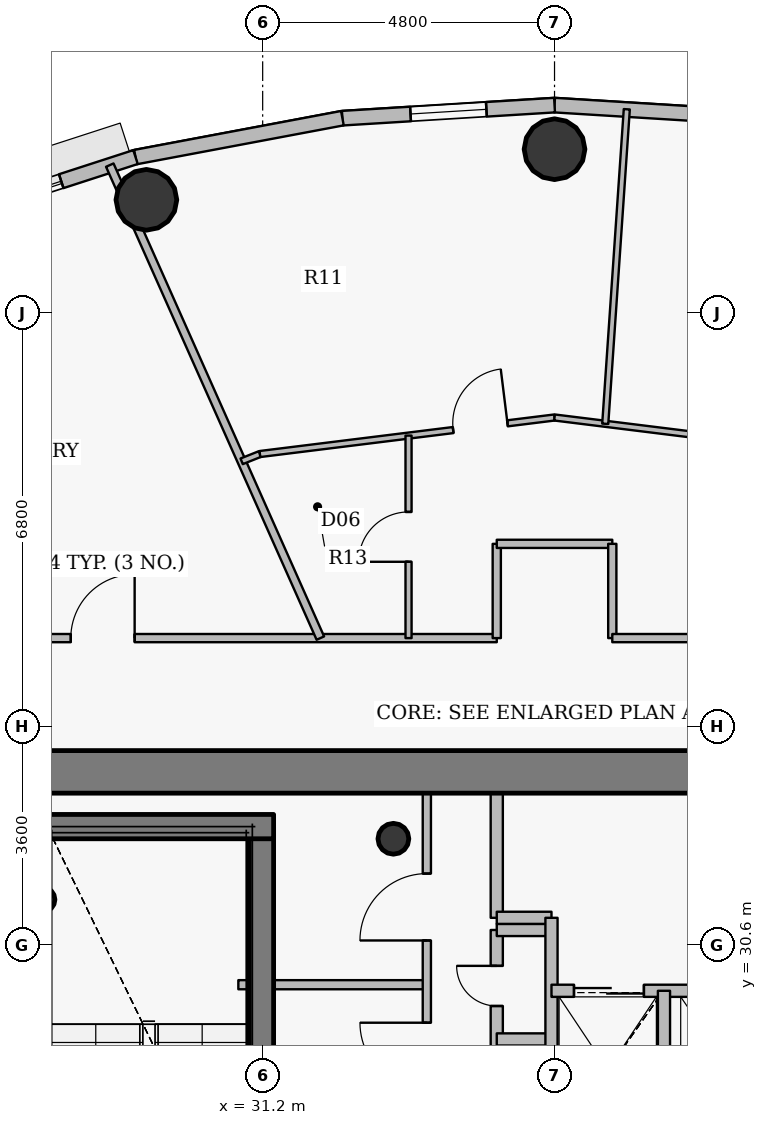
"""IFC4 building model, lengths in metres.
Left out: names, types, materials, properties, quantities, classifications, styles, units other than length and angle.
Written with IfcOpenShell. Run it as: python <this file> out.ifc"""

import sys

from ifc_helpers import new_model, si_unit, direction, frame, frame_2d, origin, origin_2d, place, context, subcontext, project, spatial, rectangle, hollow_circle, extrude, source, transform, mapped, element, fill, save


model = new_model("IFC4")
c1 = context("Model", 3, precision=1e-05, world=origin(), true_north=direction((0.0, 1.0)))
c2 = subcontext(c1, "Body", "Model", "MODEL_VIEW")
j1 = project(units=[si_unit("LENGTHUNIT", "METRE"), si_unit("PLANEANGLEUNIT", "RADIAN")], contexts=[c1])
p1 = place(None, origin())
s1 = spatial("IfcSite", under=j1, at=p1, CompositionType="ELEMENT")
p2 = place(p1, origin())
s2 = spatial("IfcBuilding", under=s1, at=p2, CompositionType="ELEMENT")
p3 = place(p2, frame((0.0, 0.0, 314.25)))
s3 = spatial("IfcBuildingStorey", under=s2, at=p3, CompositionType="ELEMENT", Elevation=314.25)
p4 = place(p3, frame((33.35, 32.35, 0.0), z_axis=(0.0, 0.0, 1.0), x_axis=(1.0, 0.0, 0.0)))
e1 = element("IfcColumn", 1, at=p4, inside=s3, PredefinedType="COLUMN", context=c2, shape_type="SweptSolid", body=[
    extrude(hollow_circle(Radius=0.254, WallThickness=0.02, at=origin_2d()), origin(), (0.0, 0.0, 1.0), 3.75),
])
p5 = place(p3, frame((31.18, 27.8, 0.0), z_axis=(0.0, 0.0, 1.0), x_axis=(0.0, 1.0, 0.0)))
e2 = element("IfcWall", 2, at=p5, inside=s3, PredefinedType="SHEAR", context=c2, shape_type="SweptSolid", body=[
    extrude(rectangle(XDim=4.75, YDim=0.4, at=frame_2d((2.375, 0.0))), origin(), (0.0, 0.0, 1.0), 3.75),
])
p6 = place(p3, frame((27.25, 32.55, 0.0), z_axis=(0.0, 0.0, 1.0), x_axis=(1.0, 0.0, 0.0)))
e3 = element("IfcWall", 3, at=p6, inside=s3, PredefinedType="SHEAR", context=c2, shape_type="SweptSolid", body=[
    extrude(rectangle(XDim=4.13, YDim=0.4, at=frame_2d((2.065, 0.0))), origin(), (0.0, 0.0, 1.0), 3.75),
])
p7 = place(p3, frame((27.58, 31.35, 0.0), z_axis=(0.0, 0.0, 1.0), x_axis=(1.0, 0.0, 0.0)))
e4 = element("IfcColumn", 4, at=p7, inside=s3, PredefinedType="COLUMN", context=c2, shape_type="SweptSolid", body=[
    extrude(hollow_circle(Radius=0.203, WallThickness=0.016, at=origin_2d()), origin(), (0.0, 0.0, 1.0), 3.75),
])
p8 = place(p3, frame((27.65, 33.45, 0.0), z_axis=(0.0, 0.0, 1.0), x_axis=(1.0, 0.0, 0.0)))
e5 = element("IfcWall", 5, at=p8, inside=s3, PredefinedType="SHEAR", context=c2, shape_type="SweptSolid", body=[
    extrude(rectangle(XDim=16.7, YDim=0.7, at=frame_2d((8.35, 0.0))), origin(), (0.0, 0.0, 1.0), 3.0),
])
p9 = place(p8, frame((12.775, 0.0, 0.0)))
e6 = element("IfcOpeningElement", 6, at=p9, cuts=e5, PredefinedType="OPENING", context=c2, shape_type="SweptSolid", body=[
    extrude(rectangle(XDim=1.15, YDim=2.15, at=origin_2d()), frame((0.575, 0.36, 1.075), z_axis=(0.0, -1.0, 0.0), x_axis=(1.0, 0.0, 0.0)), (0.0, 0.0, 1.0), 0.72),
])
for number, where, z_axis, x_axis in (
    (7, (36.0, 43.69, 0.0), (0.0, 0.0, 1.0), (1.0, 0.0, 0.0)),
    (8, (29.288, 42.858, 0.0), (0.0, 0.0, 1.0), (1.0, 0.0, 0.0)),
):
    element("IfcColumn", number, at=place(p3, frame(where, z_axis=z_axis, x_axis=x_axis)), inside=s3, PredefinedType="COLUMN", context=c2, shape_type="SweptSolid", body=[
        extrude(hollow_circle(Radius=0.5, WallThickness=0.032, at=origin_2d()), origin(), (0.0, 0.0, 1.0), 3.75),
    ])
p10 = place(p3, frame((36.0, 44.415, 0.0), z_axis=(0.0, 0.0, 1.0), x_axis=(0.998104946479, -0.061534671648, 0.0)))
e9 = element("IfcWall", 9, at=p10, inside=s3, PredefinedType="SOLIDWALL", context=c2, shape_type="SweptSolid", body=[
    extrude(rectangle(XDim=3.495, YDim=0.24, at=frame_2d((1.748, 0.0))), origin(), (0.0, 0.0, 1.0), 3.45),
])
p11 = place(p3, frame((32.511, 44.2, 0.0), z_axis=(0.0, 0.0, 1.0), x_axis=(0.998104946479, 0.061534671648, 0.0)))
e10 = element("IfcWall", 10, at=p11, inside=s3, PredefinedType="SOLIDWALL", context=c2, shape_type="SweptSolid", body=[
    extrude(rectangle(XDim=3.495, YDim=0.24, at=frame_2d((1.748, 0.0))), origin(), (0.0, 0.0, 1.0), 3.45),
])
p12 = place(p11, frame((1.123, 0.0, 0.9)))
e11 = element("IfcOpeningElement", 11, at=p12, cuts=e10, PredefinedType="OPENING", context=c2, shape_type="SweptSolid", body=[
    extrude(rectangle(XDim=1.25, YDim=1.65, at=origin_2d()), frame((0.625, 0.13, 0.825), z_axis=(0.0, -1.0, 0.0), x_axis=(1.0, 0.0, 0.0)), (0.0, 0.0, 1.0), 0.26),
])
p13 = place(p3, frame((29.109, 43.56, 0.0), z_axis=(0.0, 0.0, 1.0), x_axis=(0.982782655757, 0.184765395959, 0.0)))
e12 = element("IfcWall", 12, at=p13, inside=s3, PredefinedType="SOLIDWALL", context=c2, shape_type="SweptSolid", body=[
    extrude(rectangle(XDim=3.462, YDim=0.24, at=frame_2d((1.731, 0.0))), origin(), (0.0, 0.0, 1.0), 3.45),
])
p14 = place(p3, frame((25.877, 42.512, 0.0), z_axis=(0.0, 0.0, 1.0), x_axis=(0.95123136723, 0.308478339592, 0.0)))
e13 = element("IfcWall", 13, at=p14, inside=s3, PredefinedType="SOLIDWALL", context=c2, shape_type="SweptSolid", body=[
    extrude(rectangle(XDim=3.398, YDim=0.24, at=frame_2d((1.699, 0.0))), origin(), (0.0, 0.0, 1.0), 3.45),
])
p15 = place(p14, frame((0.863, 0.0, 0.9)))
e14 = element("IfcOpeningElement", 14, at=p15, cuts=e13, PredefinedType="OPENING", context=c2, shape_type="SweptSolid", body=[
    extrude(rectangle(XDim=1.25, YDim=1.65, at=origin_2d()), frame((0.625, 0.13, 0.825), z_axis=(0.0, -1.0, 0.0), x_axis=(1.0, 0.0, 0.0)), (0.0, 0.0, 1.0), 0.26),
])
p16 = place(p3, frame((24.95, 35.65, 0.0), z_axis=(0.0, 0.0, 1.0), x_axis=(1.0, 0.0, 0.0)))
e15 = element("IfcWall", 15, at=p16, inside=s3, PredefinedType="PARTITIONING", context=c2, shape_type="SweptSolid", body=[
    extrude(rectangle(XDim=10.1, YDim=0.135, at=frame_2d((5.05, 0.0))), origin(), (0.0, 0.0, 1.0), 2.985),
])
p17 = place(p16, frame((3.094, 0.0, 0.0)))
e16 = element("IfcOpeningElement", 16, at=p17, cuts=e15, PredefinedType="OPENING", context=c2, shape_type="SweptSolid", body=[
    extrude(rectangle(XDim=1.05, YDim=2.15, at=origin_2d()), frame((0.525, 0.078, 1.075), z_axis=(0.0, -1.0, 0.0), x_axis=(1.0, 0.0, 0.0)), (0.0, 0.0, 1.0), 0.155),
])
p18 = place(p3, frame((28.686, 43.428, 0.0), z_axis=(0.0, 0.0, 1.0), x_axis=(0.406736980157, -0.913545307564, 0.0)))
e17 = element("IfcWall", 17, at=p18, inside=s3, PredefinedType="PARTITIONING", context=c2, shape_type="SweptSolid", body=[
    extrude(rectangle(XDim=8.514, YDim=0.135, at=frame_2d((4.257, 0.0))), origin(), (0.0, 0.0, 1.0), 2.985),
])
p19 = place(p3, frame((30.8, 29.95, 0.0), z_axis=(0.0, 0.0, 1.0), x_axis=(1.0, 0.0, 0.0)))
e18 = element("IfcWall", 18, at=p19, inside=s3, PredefinedType="PARTITIONING", context=c2, shape_type="SweptSolid", body=[
    extrude(rectangle(XDim=3.1, YDim=0.15, at=frame_2d((1.55, 0.0))), origin(), (0.0, 0.0, 1.0), 3.035),
])
p20 = place(p3, frame((30.854, 38.557, 0.0), z_axis=(0.0, 0.0, 1.0), x_axis=(0.928996661722, 0.370088101011, 0.0)))
e19 = element("IfcWall", 19, at=p20, inside=s3, PredefinedType="PARTITIONING", context=c2, shape_type="SweptSolid", body=[
    extrude(rectangle(XDim=0.323, YDim=0.1, at=frame_2d((0.162, 0.0))), origin(), (0.0, 0.0, 1.0), 2.985),
])
p21 = place(p3, frame((31.155, 38.677, 0.0), z_axis=(0.0, 0.0, 1.0), x_axis=(0.99239360053, 0.123105408601, 0.0)))
e20 = element("IfcWall", 20, at=p21, inside=s3, PredefinedType="PARTITIONING", context=c2, shape_type="SweptSolid", body=[
    extrude(rectangle(XDim=4.883, YDim=0.1, at=frame_2d((2.441, 0.0))), origin(), (0.0, 0.0, 1.0), 2.985),
])
p22 = place(p21, frame((3.203, 0.0, 0.0)))
e21 = element("IfcOpeningElement", 21, at=p22, cuts=e20, PredefinedType="OPENING", context=c2, shape_type="SweptSolid", body=[
    extrude(rectangle(XDim=0.9, YDim=2.1, at=origin_2d()), frame((0.45, 0.06, 1.05), z_axis=(0.0, -1.0, 0.0), x_axis=(1.0, 0.0, 0.0)), (0.0, 0.0, 1.0), 0.12),
])
p23 = place(p3, frame((33.599, 35.65, 0.0), z_axis=(0.0, 0.0, 1.0), x_axis=(0.0, 1.0, 0.0)))
e22 = element("IfcWall", 22, at=p23, inside=s3, PredefinedType="PARTITIONING", context=c2, shape_type="SweptSolid", body=[
    extrude(rectangle(XDim=3.33, YDim=0.1, at=frame_2d((1.665, 0.0))), origin(), (0.0, 0.0, 1.0), 3.45),
])
p24 = place(p23, frame((1.255, 0.0, 0.0)))
e23 = element("IfcOpeningElement", 23, at=p24, cuts=e22, PredefinedType="OPENING", context=c2, shape_type="SweptSolid", body=[
    extrude(rectangle(XDim=0.82, YDim=2.1, at=origin_2d()), frame((0.41, 0.06, 1.05), z_axis=(0.0, -1.0, 0.0), x_axis=(1.0, 0.0, 0.0)), (0.0, 0.0, 1.0), 0.12),
])
p25 = place(p3, frame((33.9, 27.56, 0.0), z_axis=(0.0, 0.0, 1.0), x_axis=(0.0, 1.0, 0.0)))
e24 = element("IfcWall", 24, at=p25, inside=s3, PredefinedType="PARTITIONING", context=c2, shape_type="SweptSolid", body=[
    extrude(rectangle(XDim=5.54, YDim=0.135, at=frame_2d((2.77, 0.0))), origin(), (0.0, 0.0, 1.0), 3.035),
])
p26 = place(p25, frame((0.665, 0.0, 0.0)))
e25 = element("IfcOpeningElement", 25, at=p26, cuts=e24, PredefinedType="OPENING", context=c2, shape_type="SweptSolid", body=[
    extrude(rectangle(XDim=1.1, YDim=2.15, at=origin_2d()), frame((0.55, 0.078, 1.075), z_axis=(0.0, -1.0, 0.0), x_axis=(1.0, 0.0, 0.0)), (0.0, 0.0, 1.0), 0.155),
])
p27 = place(p25, frame((3.117, 0.0, 0.0)))
e26 = element("IfcOpeningElement", 26, at=p27, cuts=e24, PredefinedType="OPENING", context=c2, shape_type="SweptSolid", body=[
    extrude(rectangle(XDim=1.1, YDim=2.15, at=origin_2d()), frame((0.55, 0.078, 1.075), z_axis=(0.0, -1.0, 0.0), x_axis=(1.0, 0.0, 0.0)), (0.0, 0.0, 1.0), 0.155),
])
p28 = place(p3, frame((35.05, 27.25, 0.0), z_axis=(0.0, 0.0, 1.0), x_axis=(0.0, 1.0, 0.0)))
e27 = element("IfcWall", 27, at=p28, inside=s3, PredefinedType="PARTITIONING", context=c2, shape_type="SweptSolid", body=[
    extrude(rectangle(XDim=3.6, YDim=0.2, at=frame_2d((1.8, 0.0))), origin(), (0.0, 0.0, 1.0), 3.45),
])
p29 = place(p28, frame((0.59, 0.0, 0.0)))
e28 = element("IfcOpeningElement", 28, at=p29, cuts=e27, PredefinedType="OPENING", context=c2, shape_type="SweptSolid", body=[
    extrude(rectangle(XDim=0.66, YDim=2.05, at=origin_2d()), frame((0.33, 0.11, 1.025), z_axis=(0.0, -1.0, 0.0), x_axis=(1.0, 0.0, 0.0)), (0.0, 0.0, 1.0), 0.22),
])
p30 = place(p28, frame((2.35, 0.0, 0.0)))
e29 = element("IfcOpeningElement", 29, at=p30, cuts=e27, PredefinedType="OPENING", context=c2, shape_type="SweptSolid", body=[
    extrude(rectangle(XDim=0.66, YDim=2.05, at=origin_2d()), frame((0.33, 0.11, 1.025), z_axis=(0.0, -1.0, 0.0), x_axis=(1.0, 0.0, 0.0)), (0.0, 0.0, 1.0), 0.22),
])
for number, where, z_axis, x_axis in (
    (30, (35.05, 29.05, 0.0), (0.0, 0.0, 1.0), (1.0, 0.0, 0.0)),
    (31, (35.05, 30.85, 0.0), (0.0, 0.0, 1.0), (1.0, 0.0, 0.0)),
):
    element("IfcWall", number, at=place(p3, frame(where, z_axis=z_axis, x_axis=x_axis)), inside=s3, PredefinedType="PARTITIONING", context=c2, shape_type="SweptSolid", body=[
        extrude(rectangle(XDim=0.9, YDim=0.2, at=frame_2d((0.45, 0.0))), origin(), (0.0, 0.0, 1.0), 3.45),
    ])
p31 = place(p3, frame((35.05, 31.05, 0.0), z_axis=(0.0, 0.0, 1.0), x_axis=(0.0, 1.0, 0.0)))
e32 = element("IfcWall", 32, at=p31, inside=s3, PredefinedType="PARTITIONING", context=c2, shape_type="SweptSolid", body=[
    extrude(rectangle(XDim=2.05, YDim=0.2, at=frame_2d((1.025, 0.0))), origin(), (0.0, 0.0, 1.0), 3.035),
])
p32 = place(p3, frame((35.05, 31.05, 0.0), z_axis=(0.0, 0.0, 1.0), x_axis=(1.0, 0.0, 0.0)))
e33 = element("IfcWall", 33, at=p32, inside=s3, PredefinedType="PARTITIONING", context=c2, shape_type="SweptSolid", body=[
    extrude(rectangle(XDim=0.9, YDim=0.2, at=frame_2d((0.45, 0.0))), origin(), (0.0, 0.0, 1.0), 3.45),
])
p33 = place(p3, frame((35.05, 35.65, 0.0), z_axis=(0.0, 0.0, 1.0), x_axis=(0.0, 1.0, 0.0)))
e34 = element("IfcWall", 34, at=p33, inside=s3, PredefinedType="PARTITIONING", context=c2, shape_type="SweptSolid", body=[
    extrude(rectangle(XDim=1.55, YDim=0.135, at=frame_2d((0.775, 0.0))), origin(), (0.0, 0.0, 1.0), 3.45),
])
p34 = place(p3, frame((35.05, 37.2, 0.0), z_axis=(0.0, 0.0, 1.0), x_axis=(1.0, 0.0, 0.0)))
e35 = element("IfcWall", 35, at=p34, inside=s3, PredefinedType="PARTITIONING", context=c2, shape_type="SweptSolid", body=[
    extrude(rectangle(XDim=1.9, YDim=0.135, at=frame_2d((0.95, 0.0))), origin(), (0.0, 0.0, 1.0), 2.985),
])
p35 = place(p3, frame((35.95, 27.25, 0.0), z_axis=(0.0, 0.0, 1.0), x_axis=(0.0, 1.0, 0.0)))
e36 = element("IfcWall", 36, at=p35, inside=s3, PredefinedType="PARTITIONING", context=c2, shape_type="SweptSolid", body=[
    extrude(rectangle(XDim=3.8, YDim=0.2, at=frame_2d((1.9, 0.0))), origin(), (0.0, 0.0, 1.0), 3.45),
])
p36 = place(p3, frame((35.95, 29.85, 0.0), z_axis=(0.0, 0.0, 1.0), x_axis=(1.0, 0.0, 0.0)))
e37 = element("IfcWall", 37, at=p36, inside=s3, PredefinedType="PARTITIONING", context=c2, shape_type="SweptSolid", body=[
    extrude(rectangle(XDim=8.49, YDim=0.2, at=frame_2d((4.245, 0.0))), origin(), (0.0, 0.0, 1.0), 3.035),
])
p37 = place(p36, frame((6.1, 0.0, 0.0)))
e38 = element("IfcOpeningElement", 38, at=p37, cuts=e37, PredefinedType="OPENING", context=c2, shape_type="SweptSolid", body=[
    extrude(rectangle(XDim=1.2, YDim=2.15, at=origin_2d()), frame((0.6, 0.11, 1.075), z_axis=(0.0, -1.0, 0.0), x_axis=(1.0, 0.0, 0.0)), (0.0, 0.0, 1.0), 0.22),
])
p38 = place(p36, frame((0.37, 0.0, 0.0)))
e39 = element("IfcOpeningElement", 39, at=p38, cuts=e37, PredefinedType="OPENING", context=c2, shape_type="SweptSolid", body=[
    extrude(rectangle(XDim=1.15, YDim=2.15, at=origin_2d()), frame((0.575, 0.11, 1.075), z_axis=(0.0, -1.0, 0.0), x_axis=(1.0, 0.0, 0.0)), (0.0, 0.0, 1.0), 0.22),
])
p39 = place(p36, frame((2.425, 0.0, 0.0)))
e40 = element("IfcOpeningElement", 40, at=p39, cuts=e37, PredefinedType="OPENING", context=c2, shape_type="SweptSolid", body=[
    extrude(rectangle(XDim=1.05, YDim=2.15, at=origin_2d()), frame((0.525, 0.11, 1.075), z_axis=(0.0, -1.0, 0.0), x_axis=(1.0, 0.0, 0.0)), (0.0, 0.0, 1.0), 0.22),
])
p40 = place(p3, frame((36.0, 39.278, 0.0), z_axis=(0.0, 0.0, 1.0), x_axis=(0.992394358254, -0.123099300182, 0.0)))
e41 = element("IfcWall", 41, at=p40, inside=s3, PredefinedType="PARTITIONING", context=c2, shape_type="SweptSolid", body=[
    extrude(rectangle(XDim=4.883, YDim=0.1, at=frame_2d((2.441, 0.0))), origin(), (0.0, 0.0, 1.0), 2.985),
])
p41 = place(p3, frame((36.834, 39.175, 0.0), z_axis=(0.0, 0.0, 1.0), x_axis=(0.068331768218, 0.997662653131, 0.0)))
e42 = element("IfcWall", 42, at=p41, inside=s3, PredefinedType="PARTITIONING", context=c2, shape_type="SweptSolid", body=[
    extrude(rectangle(XDim=5.184, YDim=0.1, at=frame_2d((2.592, 0.0))), origin(), (0.0, 0.0, 1.0), 2.935),
])
p42 = place(p3, frame((36.95, 35.65, 0.0), z_axis=(0.0, 0.0, 1.0), x_axis=(0.0, 1.0, 0.0)))
e43 = element("IfcWall", 43, at=p42, inside=s3, PredefinedType="PARTITIONING", context=c2, shape_type="SweptSolid", body=[
    extrude(rectangle(XDim=1.55, YDim=0.135, at=frame_2d((0.775, 0.0))), origin(), (0.0, 0.0, 1.0), 3.45),
])
p43 = place(p3, frame((36.95, 35.65, 0.0), z_axis=(0.0, 0.0, 1.0), x_axis=(1.0, 0.0, 0.0)))
e44 = element("IfcWall", 44, at=p43, inside=s3, PredefinedType="PARTITIONING", context=c2, shape_type="SweptSolid", body=[
    extrude(rectangle(XDim=10.1, YDim=0.135, at=frame_2d((5.05, 0.0))), origin(), (0.0, 0.0, 1.0), 2.985),
])
p44 = place(p3, frame((37.8, 27.25, 0.0), z_axis=(0.0, 0.0, 1.0), x_axis=(0.0, 1.0, 0.0)))
e45 = element("IfcWall", 45, at=p44, inside=s3, PredefinedType="PARTITIONING", context=c2, shape_type="SweptSolid", body=[
    extrude(rectangle(XDim=2.6, YDim=0.2, at=frame_2d((1.3, 0.0))), origin(), (0.0, 0.0, 1.0), 3.45),
])
m1 = source(origin(), c2, "Body", "SweptSolid", [
    extrude(rectangle(XDim=1.25, YDim=1.65, at=origin_2d()), frame((0.625, 0.03, 0.825), z_axis=(0.0, -1.0, 0.0), x_axis=(1.0, 0.0, 0.0)), (0.0, 0.0, 1.0), 0.06),
])
p45 = place(p15, origin())
e46 = element("IfcWindow", 46, at=p45, inside=s3, PartitioningType="SINGLE_PANEL", PredefinedType="WINDOW", context=c2, shape_type="MappedRepresentation", body=[
    mapped(m1, transform((0.0, 0.0, 0.0), x_axis=(1.0, 0.0, 0.0), y_axis=(0.0, 1.0, 0.0), z_axis=(0.0, 0.0, 1.0), scale=1.0)),
])
fill(e14, e46)
p46 = place(p12, origin())
e47 = element("IfcWindow", 47, at=p46, inside=s3, PartitioningType="SINGLE_PANEL", PredefinedType="WINDOW", context=c2, shape_type="MappedRepresentation", body=[
    mapped(m1, transform((0.0, 0.0, 0.0), x_axis=(1.0, 0.0, 0.0), y_axis=(0.0, 1.0, 0.0), z_axis=(0.0, 0.0, 1.0), scale=1.0)),
])
fill(e11, e47)
m2 = source(origin(), c2, "Body", "SweptSolid", [
    extrude(rectangle(XDim=1.15, YDim=2.15, at=origin_2d()), frame((0.575, 0.025, 1.075), z_axis=(0.0, -1.0, 0.0), x_axis=(1.0, 0.0, 0.0)), (0.0, 0.0, 1.0), 0.05),
])
p47 = place(p38, origin())
e48 = element("IfcDoor", 48, at=p47, inside=s3, OperationType="DOUBLE_DOOR_SLIDING", PredefinedType="USERDEFINED", context=c2, shape_type="MappedRepresentation", body=[
    mapped(m2, transform((0.0, 0.0, 0.0), x_axis=(1.0, 0.0, 0.0), y_axis=(0.0, 1.0, 0.0), z_axis=(0.0, 0.0, 1.0), scale=1.0)),
])
fill(e39, e48)
m3 = source(origin(), c2, "Body", "SweptSolid", [
    extrude(rectangle(XDim=0.9, YDim=2.1, at=origin_2d()), frame((0.45, 0.025, 1.05), z_axis=(0.0, -1.0, 0.0), x_axis=(1.0, 0.0, 0.0)), (0.0, 0.0, 1.0), 0.05),
])
p48 = place(p22, origin())
e49 = element("IfcDoor", 49, at=p48, inside=s3, OperationType="SINGLE_SWING_RIGHT", PredefinedType="DOOR", context=c2, shape_type="MappedRepresentation", body=[
    mapped(m3, transform((0.0, 0.0, 0.0), x_axis=(1.0, 0.0, 0.0), y_axis=(0.0, 1.0, 0.0), z_axis=(0.0, 0.0, 1.0), scale=1.0)),
])
fill(e21, e49)
m4 = source(origin(), c2, "Body", "SweptSolid", [
    extrude(rectangle(XDim=0.82, YDim=2.1, at=origin_2d()), frame((0.41, 0.025, 1.05), z_axis=(0.0, -1.0, 0.0), x_axis=(1.0, 0.0, 0.0)), (0.0, 0.0, 1.0), 0.05),
])
p49 = place(p24, origin())
e50 = element("IfcDoor", 50, at=p49, inside=s3, OperationType="SINGLE_SWING_LEFT", PredefinedType="DOOR", context=c2, shape_type="MappedRepresentation", body=[
    mapped(m4, transform((0.0, 0.0, 0.0), x_axis=(1.0, 0.0, 0.0), y_axis=(0.0, 1.0, 0.0), z_axis=(0.0, 0.0, 1.0), scale=1.0)),
])
fill(e23, e50)
m5 = source(origin(), c2, "Body", "SweptSolid", [
    extrude(rectangle(XDim=0.66, YDim=2.05, at=origin_2d()), frame((0.33, 0.025, 1.025), z_axis=(0.0, -1.0, 0.0), x_axis=(1.0, 0.0, 0.0)), (0.0, 0.0, 1.0), 0.05),
])
p50 = place(p30, origin())
e51 = element("IfcDoor", 51, at=p50, inside=s3, OperationType="SINGLE_SWING_RIGHT", PredefinedType="USERDEFINED", context=c2, shape_type="MappedRepresentation", body=[
    mapped(m5, transform((0.0, 0.0, 0.0), x_axis=(1.0, 0.0, 0.0), y_axis=(0.0, 1.0, 0.0), z_axis=(0.0, 0.0, 1.0), scale=1.0)),
])
fill(e29, e51)
m6 = source(origin(), c2, "Body", "SweptSolid", [
    extrude(rectangle(XDim=1.1, YDim=2.15, at=origin_2d()), frame((0.55, 0.025, 1.075), z_axis=(0.0, -1.0, 0.0), x_axis=(1.0, 0.0, 0.0)), (0.0, 0.0, 1.0), 0.05),
])
p51 = place(p26, origin())
e52 = element("IfcDoor", 52, at=p51, inside=s3, OperationType="SINGLE_SWING_RIGHT", PredefinedType="DOOR", context=c2, shape_type="MappedRepresentation", body=[
    mapped(m6, transform((0.0, 0.0, 0.0), x_axis=(1.0, 0.0, 0.0), y_axis=(0.0, 1.0, 0.0), z_axis=(0.0, 0.0, 1.0), scale=1.0)),
])
fill(e25, e52)
p52 = place(p27, origin())
e53 = element("IfcDoor", 53, at=p52, inside=s3, OperationType="SINGLE_SWING_LEFT", PredefinedType="DOOR", context=c2, shape_type="MappedRepresentation", body=[
    mapped(m6, transform((0.0, 0.0, 0.0), x_axis=(1.0, 0.0, 0.0), y_axis=(0.0, 1.0, 0.0), z_axis=(0.0, 0.0, 1.0), scale=1.0)),
])
fill(e26, e53)
m7 = source(origin(), c2, "Body", "SweptSolid", [
    extrude(rectangle(XDim=1.05, YDim=2.15, at=origin_2d()), frame((0.525, 0.025, 1.075), z_axis=(0.0, -1.0, 0.0), x_axis=(1.0, 0.0, 0.0)), (0.0, 0.0, 1.0), 0.05),
])
p53 = place(p17, origin())
e54 = element("IfcDoor", 54, at=p53, inside=s3, OperationType="SINGLE_SWING_RIGHT", PredefinedType="DOOR", context=c2, shape_type="MappedRepresentation", body=[
    mapped(m7, transform((0.0, 0.0, 0.0), x_axis=(1.0, 0.0, 0.0), y_axis=(0.0, 1.0, 0.0), z_axis=(0.0, 0.0, 1.0), scale=1.0)),
])
fill(e16, e54)
save(model, sys.argv[1])
